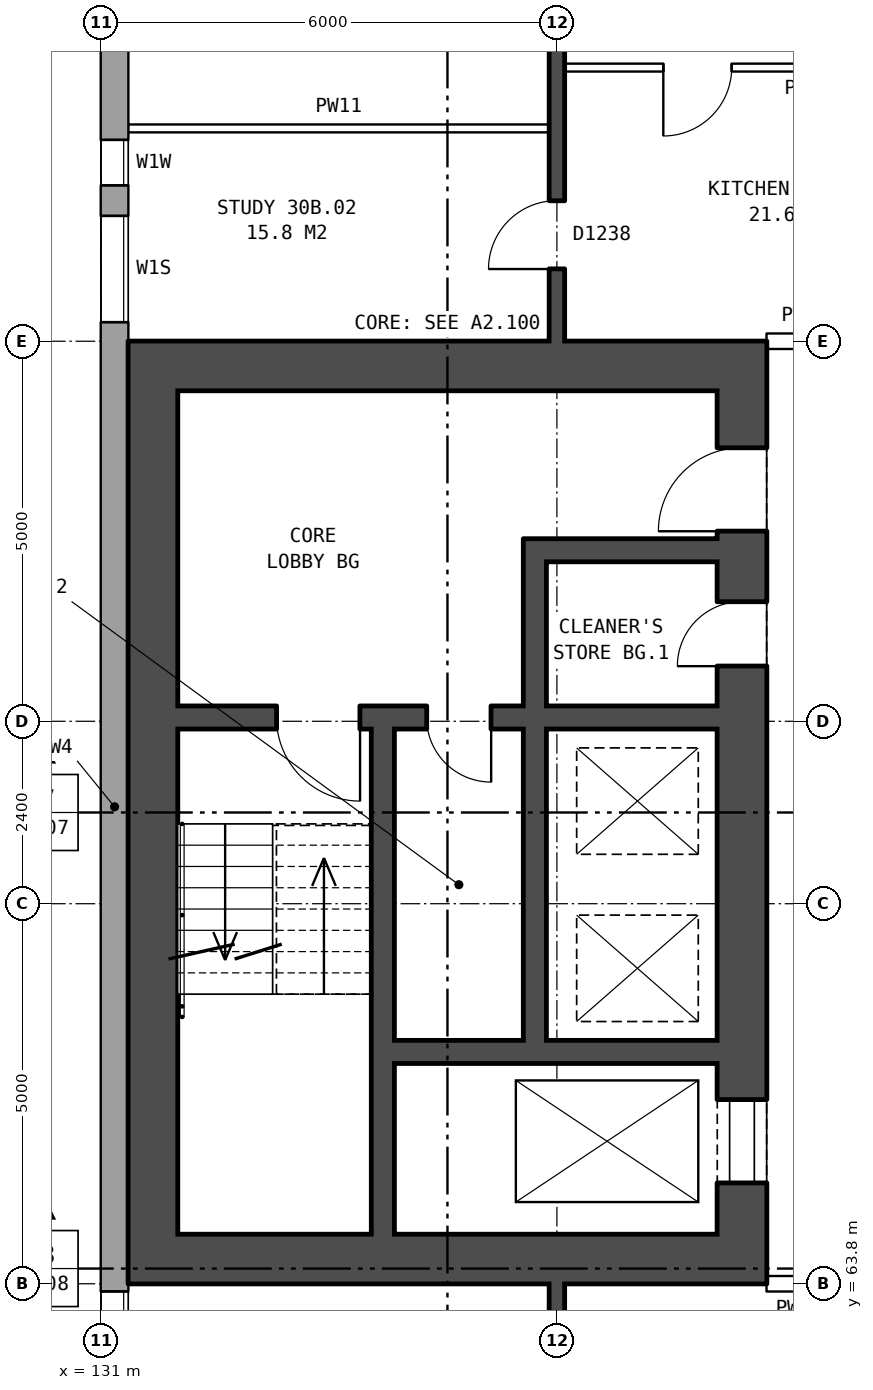
"""IFC4 building model, lengths in metres.
Left out: names, types, materials, properties, quantities, classifications, styles, units other than length and angle.
Written with IfcOpenShell. Run it as: python <this file> out.ifc"""

import sys

from ifc_helpers import new_model, si_unit, direction, frame, frame_2d, origin, place, context, subcontext, project, spatial, rectangle, extrude, element, fill, save


model = new_model("IFC4")
c1 = context("Model", 3, precision=1e-05, world=origin(), true_north=direction((0.0, 1.0)))
c2 = subcontext(c1, "Body", "Model", "MODEL_VIEW")
j1 = project(units=[si_unit("LENGTHUNIT", "METRE"), si_unit("PLANEANGLEUNIT", "RADIAN")], contexts=[c1])
p1 = place(None, origin())
s1 = spatial("IfcSite", under=j1, at=p1, CompositionType="ELEMENT")
p2 = place(p1, origin())
s2 = spatial("IfcBuilding", under=s1, at=p2, CompositionType="ELEMENT")
p3 = place(p2, frame((0.0, 0.0, 108.8)))
s3 = spatial("IfcBuildingStorey", under=s2, at=p3, CompositionType="ELEMENT", Elevation=108.8)
p4 = place(p3, frame((131.18, 82.925, 0.0), z_axis=(0.0, 0.0, 1.0), x_axis=(0.0, -1.0, 0.0)))
e1 = element("IfcWall", 1, at=p4, inside=s3, PredefinedType="STANDARD", context=c2, shape_type="SweptSolid", body=[
    extrude(rectangle(XDim=25.851, YDim=0.36, at=frame_2d((12.925, 0.0))), origin(), (0.0, 0.0, 1.0), 2.85),
])
p5 = place(p4, frame((0.3, 0.0, 0.8)))
e2 = element("IfcOpeningElement", 2, at=p5, cuts=e1, PredefinedType="OPENING", context=c2, shape_type="SweptSolid", body=[
    extrude(rectangle(XDim=1.4, YDim=1.8, at=frame_2d((0.7, 0.9))), frame((0.0, 0.19, 0.0), z_axis=(0.0, -1.0, 0.0), x_axis=(1.0, 0.0, 0.0)), (0.0, 0.0, 1.0), 0.38),
])
p6 = place(p4, frame((4.075, 0.0, 0.25)))
e3 = element("IfcOpeningElement", 3, at=p6, cuts=e1, PredefinedType="OPENING", context=c2, shape_type="SweptSolid", body=[
    extrude(rectangle(XDim=0.6, YDim=0.9, at=frame_2d((0.3, 0.45))), frame((0.0, 0.19, 0.0), z_axis=(0.0, -1.0, 0.0), x_axis=(1.0, 0.0, 0.0)), (0.0, 0.0, 1.0), 0.38),
])
p7 = place(p4, frame((19.225, 0.0, 1.7)))
e4 = element("IfcOpeningElement", 4, at=p7, cuts=e1, PredefinedType="OPENING", context=c2, shape_type="SweptSolid", body=[
    extrude(rectangle(XDim=1.6, YDim=0.9, at=frame_2d((0.8, 0.45))), frame((0.0, 0.19, 0.0), z_axis=(0.0, -1.0, 0.0), x_axis=(1.0, 0.0, 0.0)), (0.0, 0.0, 1.0), 0.38),
])
p8 = place(p4, frame((21.975, 0.0, 0.8)))
e5 = element("IfcOpeningElement", 5, at=p8, cuts=e1, PredefinedType="OPENING", context=c2, shape_type="SweptSolid", body=[
    extrude(rectangle(XDim=1.2, YDim=0.9, at=frame_2d((0.6, 0.45))), frame((0.0, 0.19, 0.0), z_axis=(0.0, -1.0, 0.0), x_axis=(1.0, 0.0, 0.0)), (0.0, 0.0, 1.0), 0.38),
])
p9 = place(p4, frame((2.0, 0.0, 0.8)))
e6 = element("IfcOpeningElement", 6, at=p9, cuts=e1, PredefinedType="OPENING", context=c2, shape_type="SweptSolid", body=[
    extrude(rectangle(XDim=0.8, YDim=1.5, at=frame_2d((0.4, 0.75))), frame((0.0, 0.19, 0.0), z_axis=(0.0, -1.0, 0.0), x_axis=(1.0, 0.0, 0.0)), (0.0, 0.0, 1.0), 0.38),
])
p10 = place(p4, frame((5.075, 0.0, 1.65)))
e7 = element("IfcOpeningElement", 7, at=p10, cuts=e1, PredefinedType="OPENING", context=c2, shape_type="SweptSolid", body=[
    extrude(rectangle(XDim=1.4, YDim=0.9, at=frame_2d((0.7, 0.45))), frame((0.0, 0.19, 0.0), z_axis=(0.0, -1.0, 0.0), x_axis=(1.0, 0.0, 0.0)), (0.0, 0.0, 1.0), 0.38),
])
p11 = place(p4, frame((23.475, 0.0, 0.8)))
e8 = element("IfcOpeningElement", 8, at=p11, cuts=e1, PredefinedType="OPENING", context=c2, shape_type="SweptSolid", body=[
    extrude(rectangle(XDim=1.2, YDim=1.8, at=frame_2d((0.6, 0.9))), frame((0.0, 0.19, 0.0), z_axis=(0.0, -1.0, 0.0), x_axis=(1.0, 0.0, 0.0)), (0.0, 0.0, 1.0), 0.38),
])
p12 = place(p3, frame((139.435, 64.45, 0.0), z_axis=(0.0, 0.0, 1.0), x_axis=(0.0, 1.0, 0.0)))
e9 = element("IfcWall", 9, at=p12, inside=s3, PredefinedType="SHEAR", context=c2, shape_type="SweptSolid", body=[
    extrude(rectangle(XDim=11.1, YDim=0.65, at=frame_2d((5.55, 0.0))), origin(), (0.0, 0.0, 1.0), 2.85),
])
p13 = place(p12, frame((0.675, 0.0, 0.0)))
e10 = element("IfcOpeningElement", 10, at=p13, cuts=e9, PredefinedType="OPENING", context=c2, shape_type="SweptSolid", body=[
    extrude(rectangle(XDim=1.1, YDim=2.1, at=frame_2d((0.55, 1.05))), frame((0.0, 0.335, 0.0), z_axis=(0.0, -1.0, 0.0), x_axis=(1.0, 0.0, 0.0)), (0.0, 0.0, 1.0), 0.67),
])
p14 = place(p12, frame((9.25, 0.0, 0.0)))
e11 = element("IfcOpeningElement", 11, at=p14, cuts=e9, PredefinedType="OPENING", context=c2, shape_type="SweptSolid", body=[
    extrude(rectangle(XDim=1.1, YDim=2.1, at=frame_2d((0.55, 1.05))), frame((0.0, 0.335, 0.0), z_axis=(0.0, -1.0, 0.0), x_axis=(1.0, 0.0, 0.0)), (0.0, 0.0, 1.0), 0.67),
])
p15 = place(p12, frame((7.475, 0.0, 0.0)))
e12 = element("IfcOpeningElement", 12, at=p15, cuts=e9, PredefinedType="OPENING", context=c2, shape_type="SweptSolid", body=[
    extrude(rectangle(XDim=0.85, YDim=2.1, at=frame_2d((0.425, 1.05))), frame((0.0, 0.335, 0.0), z_axis=(0.0, -1.0, 0.0), x_axis=(1.0, 0.0, 0.0)), (0.0, 0.0, 1.0), 0.67),
])
p16 = place(p3, frame((131.685, 64.45, 0.0), z_axis=(0.0, 0.0, 1.0), x_axis=(0.0, 1.0, 0.0)))
e13 = element("IfcWall", 13, at=p16, inside=s3, PredefinedType="SHEAR", context=c2, shape_type="SweptSolid", body=[
    extrude(rectangle(XDim=11.1, YDim=0.65, at=frame_2d((5.55, 0.0))), origin(), (0.0, 0.0, 1.0), 2.85),
])
for number, where, z_axis, x_axis in (
    (14, (139.76, 64.125, 0.0), (0.0, 0.0, 1.0), (-1.0, 0.0, 0.0)),
    (15, (139.76, 75.875, 0.0), (0.0, 0.0, 1.0), (-1.0, 0.0, 0.0)),
):
    element("IfcWall", number, at=place(p3, frame(where, z_axis=z_axis, x_axis=x_axis)), inside=s3, PredefinedType="SHEAR", context=c2, shape_type="SweptSolid", body=[
        extrude(rectangle(XDim=8.4, YDim=0.65, at=frame_2d((4.2, 0.0))), origin(), (0.0, 0.0, 1.0), 2.85),
    ])
p17 = place(p3, frame((139.11, 66.85, 0.0), z_axis=(0.0, 0.0, 1.0), x_axis=(-1.0, 0.0, 0.0)))
e16 = element("IfcWall", 16, at=p17, inside=s3, PredefinedType="SHEAR", context=c2, shape_type="SweptSolid", body=[
    extrude(rectangle(XDim=4.25, YDim=0.3, at=frame_2d((2.125, 0.0))), origin(), (0.0, 0.0, 1.0), 2.85),
])
p18 = place(p3, frame((139.11, 71.25, 0.0), z_axis=(0.0, 0.0, 1.0), x_axis=(-1.0, 0.0, 0.0)))
e17 = element("IfcWall", 17, at=p18, inside=s3, PredefinedType="SHEAR", context=c2, shape_type="SweptSolid", body=[
    extrude(rectangle(XDim=7.1, YDim=0.3, at=frame_2d((3.55, 0.0))), origin(), (0.0, 0.0, 1.0), 2.85),
])
p19 = place(p18, frame((4.7, 0.0, 0.0)))
e18 = element("IfcOpeningElement", 18, at=p19, cuts=e17, PredefinedType="OPENING", context=c2, shape_type="SweptSolid", body=[
    extrude(rectangle(XDim=1.1, YDim=2.1, at=frame_2d((0.55, 1.05))), frame((0.0, 0.16, 0.0), z_axis=(0.0, -1.0, 0.0), x_axis=(1.0, 0.0, 0.0)), (0.0, 0.0, 1.0), 0.32),
])
p20 = place(p18, frame((2.975, 0.0, 0.0)))
e19 = element("IfcOpeningElement", 19, at=p20, cuts=e17, PredefinedType="OPENING", context=c2, shape_type="SweptSolid", body=[
    extrude(rectangle(XDim=0.85, YDim=2.1, at=frame_2d((0.425, 1.05))), frame((0.0, 0.16, 0.0), z_axis=(0.0, -1.0, 0.0), x_axis=(1.0, 0.0, 0.0)), (0.0, 0.0, 1.0), 0.32),
])
p21 = place(p3, frame((139.11, 73.45, 0.0), z_axis=(0.0, 0.0, 1.0), x_axis=(-1.0, 0.0, 0.0)))
e20 = element("IfcWall", 20, at=p21, inside=s3, PredefinedType="SHEAR", context=c2, shape_type="SweptSolid", body=[
    extrude(rectangle(XDim=2.25, YDim=0.3, at=frame_2d((1.125, 0.0))), origin(), (0.0, 0.0, 1.0), 2.85),
])
p22 = place(p3, frame((136.71, 67.0, 0.0), z_axis=(0.0, 0.0, 1.0), x_axis=(0.0, 1.0, 0.0)))
e21 = element("IfcWall", 21, at=p22, inside=s3, PredefinedType="SHEAR", context=c2, shape_type="SweptSolid", body=[
    extrude(rectangle(XDim=4.1, YDim=0.3, at=frame_2d((2.05, 0.0))), origin(), (0.0, 0.0, 1.0), 2.85),
])
p23 = place(p3, frame((136.71, 71.4, 0.0), z_axis=(0.0, 0.0, 1.0), x_axis=(0.0, 1.0, 0.0)))
e22 = element("IfcWall", 22, at=p23, inside=s3, PredefinedType="SHEAR", context=c2, shape_type="SweptSolid", body=[
    extrude(rectangle(XDim=2.2, YDim=0.3, at=frame_2d((1.1, 0.0))), origin(), (0.0, 0.0, 1.0), 2.85),
])
p24 = place(p3, frame((134.71, 64.45, 0.0), z_axis=(0.0, 0.0, 1.0), x_axis=(0.0, 1.0, 0.0)))
e23 = element("IfcWall", 23, at=p24, inside=s3, PredefinedType="SHEAR", context=c2, shape_type="SweptSolid", body=[
    extrude(rectangle(XDim=6.65, YDim=0.3, at=frame_2d((3.325, 0.0))), origin(), (0.0, 0.0, 1.0), 2.85),
])
p25 = place(p3, frame((139.76, 63.8, 0.0), z_axis=(0.0, 0.0, 1.0), x_axis=(1.0, 0.0, 0.0)))
e24 = element("IfcWall", 24, at=p25, inside=s3, PredefinedType="PARTITIONING", context=c2, shape_type="SweptSolid", body=[
    extrude(rectangle(XDim=3.0, YDim=0.2, at=frame_2d((1.5, 0.0))), origin(), (0.0, 0.0, 1.0), 2.85),
])
p26 = place(p25, frame((1.0, 0.0, 0.0)))
e25 = element("IfcOpeningElement", 25, at=p26, cuts=e24, PredefinedType="OPENING", context=c2, shape_type="SweptSolid", body=[
    extrude(rectangle(XDim=1.0, YDim=2.1, at=frame_2d((0.5, 1.05))), frame((0.0, 0.11, 0.0), z_axis=(0.0, -1.0, 0.0), x_axis=(1.0, 0.0, 0.0)), (0.0, 0.0, 1.0), 0.22),
])
p27 = place(p3, frame((139.76, 76.2, 0.0), z_axis=(0.0, 0.0, 1.0), x_axis=(1.0, 0.0, 0.0)))
e26 = element("IfcWall", 26, at=p27, inside=s3, PredefinedType="PARTITIONING", context=c2, shape_type="SweptSolid", body=[
    extrude(rectangle(XDim=3.0, YDim=0.2, at=frame_2d((1.5, 0.0))), origin(), (0.0, 0.0, 1.0), 2.85),
])
p28 = place(p27, frame((1.0, 0.0, 0.0)))
e27 = element("IfcOpeningElement", 27, at=p28, cuts=e26, PredefinedType="OPENING", context=c2, shape_type="SweptSolid", body=[
    extrude(rectangle(XDim=1.0, YDim=2.1, at=frame_2d((0.5, 1.05))), frame((0.0, 0.11, 0.0), z_axis=(0.0, -1.0, 0.0), x_axis=(1.0, 0.0, 0.0)), (0.0, 0.0, 1.0), 0.22),
])
p29 = place(p3, frame((131.36, 79.0, 0.0), z_axis=(0.0, 0.0, 1.0), x_axis=(1.0, 0.0, 0.0)))
e28 = element("IfcWall", 28, at=p29, inside=s3, PredefinedType="PARTITIONING", context=c2, shape_type="SweptSolid", body=[
    extrude(rectangle(XDim=5.54, YDim=0.1, at=frame_2d((2.77, 0.0))), origin(), (0.0, 0.0, 1.0), 2.85),
])
p30 = place(p3, frame((137.1, 79.8, 0.0), z_axis=(0.0, 0.0, 1.0), x_axis=(1.0, 0.0, 0.0)))
e29 = element("IfcWall", 29, at=p30, inside=s3, PredefinedType="PARTITIONING", context=c2, shape_type="SweptSolid", body=[
    extrude(rectangle(XDim=5.8, YDim=0.1, at=frame_2d((2.9, 0.0))), origin(), (0.0, 0.0, 1.0), 2.85),
])
p31 = place(p30, frame((1.3, 0.0, 0.0)))
e30 = element("IfcOpeningElement", 30, at=p31, cuts=e29, PredefinedType="OPENING", context=c2, shape_type="SweptSolid", body=[
    extrude(rectangle(XDim=0.9, YDim=2.1, at=frame_2d((0.45, 1.05))), frame((0.0, 0.06, 0.0), z_axis=(0.0, -1.0, 0.0), x_axis=(1.0, 0.0, 0.0)), (0.0, 0.0, 1.0), 0.12),
])
p32 = place(p30, frame((4.2, 0.0, 0.0)))
e31 = element("IfcOpeningElement", 31, at=p32, cuts=e29, PredefinedType="OPENING", context=c2, shape_type="SweptSolid", body=[
    extrude(rectangle(XDim=0.9, YDim=2.1, at=frame_2d((0.45, 1.05))), frame((0.0, 0.06, 0.0), z_axis=(0.0, -1.0, 0.0), x_axis=(1.0, 0.0, 0.0)), (0.0, 0.0, 1.0), 0.12),
])
p33 = place(p3, frame((137.0, 54.36, 0.0), z_axis=(0.0, 0.0, 1.0), x_axis=(0.0, 1.0, 0.0)))
e32 = element("IfcWall", 32, at=p33, inside=s3, PredefinedType="SOLIDWALL", context=c2, shape_type="SweptSolid", body=[
    extrude(rectangle(XDim=9.44, YDim=0.2, at=frame_2d((4.72, 0.0))), origin(), (0.0, 0.0, 1.0), 2.85),
])
p34 = place(p33, frame((7.19, 0.0, 0.0)))
e33 = element("IfcOpeningElement", 33, at=p34, cuts=e32, PredefinedType="OPENING", context=c2, shape_type="SweptSolid", body=[
    extrude(rectangle(XDim=0.9, YDim=2.1, at=frame_2d((0.45, 1.05))), frame((0.0, 0.11, 0.0), z_axis=(0.0, -1.0, 0.0), x_axis=(1.0, 0.0, 0.0)), (0.0, 0.0, 1.0), 0.22),
])
p35 = place(p3, frame((137.0, 76.2, 0.0), z_axis=(0.0, 0.0, 1.0), x_axis=(0.0, 1.0, 0.0)))
e34 = element("IfcWall", 34, at=p35, inside=s3, PredefinedType="SOLIDWALL", context=c2, shape_type="SweptSolid", body=[
    extrude(rectangle(XDim=9.44, YDim=0.2, at=frame_2d((4.72, 0.0))), origin(), (0.0, 0.0, 1.0), 2.85),
])
p36 = place(p35, frame((6.07, 0.0, 0.0)))
e35 = element("IfcOpeningElement", 35, at=p36, cuts=e34, PredefinedType="OPENING", context=c2, shape_type="SweptSolid", body=[
    extrude(rectangle(XDim=0.9, YDim=2.1, at=frame_2d((0.45, 1.05))), frame((0.0, 0.11, 0.0), z_axis=(0.0, -1.0, 0.0), x_axis=(1.0, 0.0, 0.0)), (0.0, 0.0, 1.0), 0.22),
])
p37 = place(p35, frame((0.95, 0.0, 0.0)))
e36 = element("IfcOpeningElement", 36, at=p37, cuts=e34, PredefinedType="OPENING", context=c2, shape_type="SweptSolid", body=[
    extrude(rectangle(XDim=0.9, YDim=2.1, at=frame_2d((0.45, 1.05))), frame((0.0, 0.11, 0.0), z_axis=(0.0, -1.0, 0.0), x_axis=(1.0, 0.0, 0.0)), (0.0, 0.0, 1.0), 0.22),
])
p38 = place(p6, origin())
e37 = element("IfcWindow", 37, at=p38, inside=s3, PartitioningType="SINGLE_PANEL", PredefinedType="WINDOW", context=c2, shape_type="SweptSolid", body=[
    extrude(rectangle(XDim=0.6, YDim=0.9, at=frame_2d((0.3, 0.45))), frame((0.0, 0.15, 0.0), z_axis=(0.0, -1.0, 0.0), x_axis=(1.0, 0.0, 0.0)), (0.0, 0.0, 1.0), 0.06),
])
fill(e3, e37)
p39 = place(p7, origin())
e38 = element("IfcWindow", 38, at=p39, inside=s3, PartitioningType="SINGLE_PANEL", PredefinedType="WINDOW", context=c2, shape_type="SweptSolid", body=[
    extrude(rectangle(XDim=1.6, YDim=0.9, at=frame_2d((0.8, 0.45))), frame((0.0, 0.15, 0.0), z_axis=(0.0, -1.0, 0.0), x_axis=(1.0, 0.0, 0.0)), (0.0, 0.0, 1.0), 0.06),
])
fill(e4, e38)
p40 = place(p13, origin())
e39 = element("IfcDoor", 39, at=p40, inside=s3, OperationType="DOUBLE_DOOR_SLIDING", PredefinedType="DOOR", context=c2, shape_type="SweptSolid", body=[
    extrude(rectangle(XDim=1.1, YDim=2.1, at=frame_2d((0.55, 1.05))), frame((0.0, 0.31, 0.0), z_axis=(0.0, -1.0, 0.0), x_axis=(1.0, 0.0, 0.0)), (0.0, 0.0, 1.0), 0.05),
])
fill(e10, e39)
p41 = place(p14, origin())
e40 = element("IfcDoor", 40, at=p41, inside=s3, OperationType="SINGLE_SWING_LEFT", PredefinedType="DOOR", context=c2, shape_type="SweptSolid", body=[
    extrude(rectangle(XDim=1.1, YDim=2.1, at=frame_2d((0.55, 1.05))), frame((0.0, 0.31, 0.0), z_axis=(0.0, -1.0, 0.0), x_axis=(1.0, 0.0, 0.0)), (0.0, 0.0, 1.0), 0.05),
])
fill(e11, e40)
p42 = place(p19, origin())
e41 = element("IfcDoor", 41, at=p42, inside=s3, OperationType="SINGLE_SWING_LEFT", PredefinedType="DOOR", context=c2, shape_type="SweptSolid", body=[
    extrude(rectangle(XDim=1.1, YDim=2.1, at=frame_2d((0.55, 1.05))), frame((0.0, 0.025, 0.0), z_axis=(0.0, -1.0, 0.0), x_axis=(1.0, 0.0, 0.0)), (0.0, 0.0, 1.0), 0.05),
])
fill(e18, e41)
p43 = place(p15, origin())
e42 = element("IfcDoor", 42, at=p43, inside=s3, OperationType="SINGLE_SWING_LEFT", PredefinedType="DOOR", context=c2, shape_type="SweptSolid", body=[
    extrude(rectangle(XDim=0.85, YDim=2.1, at=frame_2d((0.425, 1.05))), frame((0.0, 0.31, 0.0), z_axis=(0.0, -1.0, 0.0), x_axis=(1.0, 0.0, 0.0)), (0.0, 0.0, 1.0), 0.05),
])
fill(e12, e42)
p44 = place(p20, origin())
e43 = element("IfcDoor", 43, at=p44, inside=s3, OperationType="SINGLE_SWING_LEFT", PredefinedType="DOOR", context=c2, shape_type="SweptSolid", body=[
    extrude(rectangle(XDim=0.85, YDim=2.1, at=frame_2d((0.425, 1.05))), frame((0.0, 0.025, 0.0), z_axis=(0.0, -1.0, 0.0), x_axis=(1.0, 0.0, 0.0)), (0.0, 0.0, 1.0), 0.05),
])
fill(e19, e43)
p45 = place(p37, origin())
e44 = element("IfcDoor", 44, at=p45, inside=s3, OperationType="SINGLE_SWING_LEFT", PredefinedType="DOOR", context=c2, shape_type="SweptSolid", body=[
    extrude(rectangle(XDim=0.9, YDim=2.1, at=frame_2d((0.45, 1.05))), frame((0.0, 0.025, 0.0), z_axis=(0.0, -1.0, 0.0), x_axis=(1.0, 0.0, 0.0)), (0.0, 0.0, 1.0), 0.05),
])
fill(e36, e44)
p46 = place(p31, frame((0.9, 0.0, 0.0), z_axis=(0.0, 0.0, 1.0), x_axis=(-1.0, 0.0, 0.0)))
e45 = element("IfcDoor", 45, at=p46, inside=s3, OperationType="SINGLE_SWING_RIGHT", PredefinedType="DOOR", context=c2, shape_type="SweptSolid", body=[
    extrude(rectangle(XDim=0.9, YDim=2.1, at=frame_2d((0.45, 1.05))), frame((0.0, 0.025, 0.0), z_axis=(0.0, -1.0, 0.0), x_axis=(1.0, 0.0, 0.0)), (0.0, 0.0, 1.0), 0.05),
])
fill(e30, e45)
p47 = place(p10, origin())
e46 = element("IfcWindow", 46, at=p47, inside=s3, PartitioningType="SINGLE_PANEL", PredefinedType="WINDOW", context=c2, shape_type="SweptSolid", body=[
    extrude(rectangle(XDim=1.4, YDim=0.9, at=frame_2d((0.7, 0.45))), frame((0.0, 0.15, 0.0), z_axis=(0.0, -1.0, 0.0), x_axis=(1.0, 0.0, 0.0)), (0.0, 0.0, 1.0), 0.06),
])
fill(e7, e46)
save(model, sys.argv[1])
